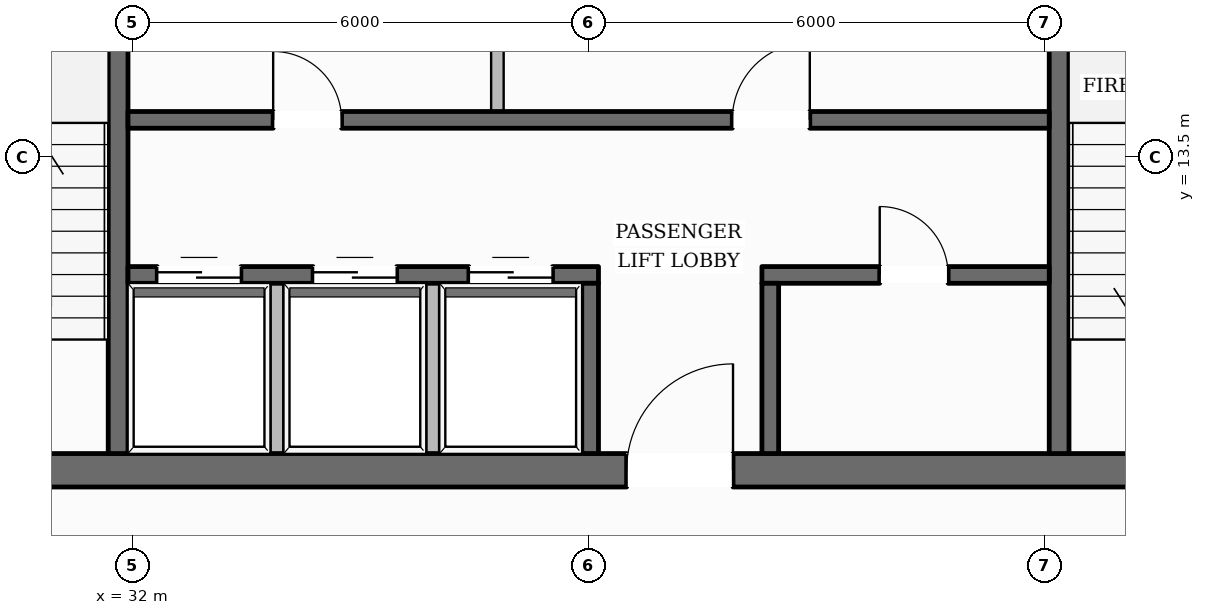
"""IFC4 building model, lengths in metres.
Left out: names, types, materials, properties, quantities, classifications, styles, units other than length and angle.
Written with IfcOpenShell. Run it as: python <this file> out.ifc"""

import sys

from ifc_helpers import new_model, si_unit, direction, frame, frame_2d, origin, place, context, subcontext, project, spatial, rectangle, extrude, element, fill, save


model = new_model("IFC4")
c1 = context("Model", 3, precision=1e-05, world=origin(), true_north=direction((0.0, 1.0)))
c2 = subcontext(c1, "Body", "Model", "MODEL_VIEW")
j1 = project(units=[si_unit("LENGTHUNIT", "METRE"), si_unit("PLANEANGLEUNIT", "RADIAN")], contexts=[c1])
p1 = place(None, origin())
s1 = spatial("IfcSite", under=j1, at=p1, CompositionType="ELEMENT")
p2 = place(p1, origin())
s2 = spatial("IfcBuilding", under=s1, at=p2, CompositionType="ELEMENT")
p3 = place(p2, frame((0.0, 0.0, 180.4)))
s3 = spatial("IfcBuildingStorey", under=s2, at=p3, CompositionType="ELEMENT", Elevation=180.4)
p4 = place(p3, frame((28.04, 9.38, 0.0), z_axis=(0.0, 0.0, 1.0), x_axis=(1.0, 0.0, 0.0)))
e1 = element("IfcWall", 1, at=p4, inside=s3, PredefinedType="SOLIDWALL", context=c2, shape_type="SweptSolid", body=[
    extrude(rectangle(XDim=19.92, YDim=0.44, at=frame_2d((9.96, 0.0))), origin(), (0.0, 0.0, 1.0), 3.6),
])
p5 = place(p4, frame((10.46, 0.0, 0.0)))
e2 = element("IfcOpeningElement", 2, at=p5, cuts=e1, PredefinedType="OPENING", context=c2, shape_type="SweptSolid", body=[
    extrude(rectangle(XDim=1.4, YDim=2.2, at=frame_2d((0.7, 1.1))), frame((0.0, 0.23, 0.0), z_axis=(0.0, -1.0, 0.0), x_axis=(1.0, 0.0, 0.0)), (0.0, 0.0, 1.0), 0.46),
])
p6 = place(p3, frame((31.81, 9.6, 0.0), z_axis=(0.0, 0.0, 1.0), x_axis=(0.0, 1.0, 0.0)))
e3 = element("IfcWall", 3, at=p6, inside=s3, PredefinedType="SHEAR", context=c2, shape_type="SweptSolid", body=[
    extrude(rectangle(XDim=13.0, YDim=0.26, at=frame_2d((6.5, 0.0))), origin(), (0.0, 0.0, 1.0), 3.6),
])
p7 = place(p6, frame((10.925, 0.0, 0.0)))
e4 = element("IfcOpeningElement", 4, at=p7, cuts=e3, PredefinedType="OPENING", context=c2, shape_type="SweptSolid", body=[
    extrude(rectangle(XDim=1.25, YDim=2.25, at=frame_2d((0.625, 1.125))), frame((0.0, 0.14, 0.0), z_axis=(0.0, -1.0, 0.0), x_axis=(1.0, 0.0, 0.0)), (0.0, 0.0, 1.0), 0.28),
])
p8 = place(p3, frame((44.19, 9.6, 0.0), z_axis=(0.0, 0.0, 1.0), x_axis=(0.0, 1.0, 0.0)))
e5 = element("IfcWall", 5, at=p8, inside=s3, PredefinedType="SHEAR", context=c2, shape_type="SweptSolid", body=[
    extrude(rectangle(XDim=13.0, YDim=0.26, at=frame_2d((6.5, 0.0))), origin(), (0.0, 0.0, 1.0), 3.6),
])
p9 = place(p8, frame((10.925, 0.0, 0.0)))
e6 = element("IfcOpeningElement", 6, at=p9, cuts=e5, PredefinedType="OPENING", context=c2, shape_type="SweptSolid", body=[
    extrude(rectangle(XDim=1.25, YDim=2.25, at=frame_2d((0.625, 1.125))), frame((0.0, 0.14, 0.0), z_axis=(0.0, -1.0, 0.0), x_axis=(1.0, 0.0, 0.0)), (0.0, 0.0, 1.0), 0.28),
])
p10 = place(p3, frame((31.94, 13.99, 0.0), z_axis=(0.0, 0.0, 1.0), x_axis=(1.0, 0.0, 0.0)))
e7 = element("IfcWall", 7, at=p10, inside=s3, PredefinedType="SOLIDWALL", context=c2, shape_type="SweptSolid", body=[
    extrude(rectangle(XDim=12.12, YDim=0.22, at=frame_2d((6.06, 0.0))), origin(), (0.0, 0.0, 1.0), 3.6),
])
p11 = place(p10, frame((1.91, 0.0, 0.0)))
e8 = element("IfcOpeningElement", 8, at=p11, cuts=e7, PredefinedType="OPENING", context=c2, shape_type="SweptSolid", body=[
    extrude(rectangle(XDim=0.9, YDim=2.1, at=frame_2d((0.45, 1.05))), frame((0.0, 0.12, 0.0), z_axis=(0.0, -1.0, 0.0), x_axis=(1.0, 0.0, 0.0)), (0.0, 0.0, 1.0), 0.24),
])
p12 = place(p10, frame((7.95, 0.0, 0.0)))
e9 = element("IfcOpeningElement", 9, at=p12, cuts=e7, PredefinedType="OPENING", context=c2, shape_type="SweptSolid", body=[
    extrude(rectangle(XDim=1.02, YDim=2.15, at=frame_2d((0.51, 1.075))), frame((0.0, 0.12, 0.0), z_axis=(0.0, -1.0, 0.0), x_axis=(1.0, 0.0, 0.0)), (0.0, 0.0, 1.0), 0.24),
])
p13 = place(p3, frame((31.94, 11.95, 0.0), z_axis=(0.0, 0.0, 1.0), x_axis=(1.0, 0.0, 0.0)))
e10 = element("IfcWall", 10, at=p13, inside=s3, PredefinedType="SOLIDWALL", context=c2, shape_type="SweptSolid", body=[
    extrude(rectangle(XDim=6.19, YDim=0.22, at=frame_2d((3.095, 0.0))), origin(), (0.0, 0.0, 1.0), 3.6),
])
p14 = place(p13, frame((0.385, 0.0, 0.0)))
e11 = element("IfcOpeningElement", 11, at=p14, cuts=e10, PredefinedType="OPENING", context=c2, shape_type="SweptSolid", body=[
    extrude(rectangle(XDim=1.1, YDim=2.2, at=frame_2d((0.55, 1.1))), frame((0.0, 0.12, 0.0), z_axis=(0.0, -1.0, 0.0), x_axis=(1.0, 0.0, 0.0)), (0.0, 0.0, 1.0), 0.24),
])
p15 = place(p13, frame((2.435, 0.0, 0.0)))
e12 = element("IfcOpeningElement", 12, at=p15, cuts=e10, PredefinedType="OPENING", context=c2, shape_type="SweptSolid", body=[
    extrude(rectangle(XDim=1.1, YDim=2.2, at=frame_2d((0.55, 1.1))), frame((0.0, 0.12, 0.0), z_axis=(0.0, -1.0, 0.0), x_axis=(1.0, 0.0, 0.0)), (0.0, 0.0, 1.0), 0.24),
])
p16 = place(p13, frame((4.485, 0.0, 0.0)))
e13 = element("IfcOpeningElement", 13, at=p16, cuts=e10, PredefinedType="OPENING", context=c2, shape_type="SweptSolid", body=[
    extrude(rectangle(XDim=1.1, YDim=2.2, at=frame_2d((0.55, 1.1))), frame((0.0, 0.12, 0.0), z_axis=(0.0, -1.0, 0.0), x_axis=(1.0, 0.0, 0.0)), (0.0, 0.0, 1.0), 0.24),
])
p17 = place(p3, frame((40.28, 11.95, 0.0), z_axis=(0.0, 0.0, 1.0), x_axis=(1.0, 0.0, 0.0)))
e14 = element("IfcWall", 14, at=p17, inside=s3, PredefinedType="SOLIDWALL", context=c2, shape_type="SweptSolid", body=[
    extrude(rectangle(XDim=3.78, YDim=0.22, at=frame_2d((1.89, 0.0))), origin(), (0.0, 0.0, 1.0), 3.6),
])
p18 = place(p17, frame((1.55, 0.0, 0.0)))
e15 = element("IfcOpeningElement", 15, at=p18, cuts=e14, PredefinedType="OPENING", context=c2, shape_type="SweptSolid", body=[
    extrude(rectangle(XDim=0.9, YDim=2.1, at=frame_2d((0.45, 1.05))), frame((0.0, 0.12, 0.0), z_axis=(0.0, -1.0, 0.0), x_axis=(1.0, 0.0, 0.0)), (0.0, 0.0, 1.0), 0.24),
])
for number, where, z_axis, x_axis in (
    (16, (38.02, 9.6, 0.0), (0.0, 0.0, 1.0), (0.0, 1.0, 0.0)),
    (17, (40.39, 9.6, 0.0), (0.0, 0.0, 1.0), (0.0, 1.0, 0.0)),
):
    element("IfcWall", number, at=place(p3, frame(where, z_axis=z_axis, x_axis=x_axis)), inside=s3, PredefinedType="SOLIDWALL", context=c2, shape_type="SweptSolid", body=[
        extrude(rectangle(XDim=2.24, YDim=0.22, at=frame_2d((1.12, 0.0))), origin(), (0.0, 0.0, 1.0), 3.6),
    ])
p19 = place(p3, frame((15.064, 11.953, 0.0), z_axis=(0.0, 0.0, 1.0), x_axis=(0.495993114815, 0.86832645362, 0.0)))
e18 = element("IfcWall", 18, at=p19, inside=s3, PredefinedType="STANDARD", context=c2, shape_type="SweptSolid", body=[
    extrude(rectangle(XDim=37.324, YDim=0.35, at=frame_2d((18.662, 0.0))), origin(), (0.0, 0.0, 1.0), 3.132),
])
p20 = place(p19, frame((33.087, 0.0, 0.65)))
e19 = element("IfcOpeningElement", 19, at=p20, cuts=e18, PredefinedType="OPENING", context=c2, shape_type="SweptSolid", body=[
    extrude(rectangle(XDim=1.45, YDim=1.75, at=frame_2d((0.725, 0.875))), frame((0.0, 0.185, 0.0), z_axis=(0.0, -1.0, 0.0), x_axis=(1.0, 0.0, 0.0)), (0.0, 0.0, 1.0), 0.37),
])
p21 = place(p19, frame((27.026, 0.0, 0.65)))
e20 = element("IfcOpeningElement", 20, at=p21, cuts=e18, PredefinedType="OPENING", context=c2, shape_type="SweptSolid", body=[
    extrude(rectangle(XDim=1.45, YDim=1.75, at=frame_2d((0.725, 0.875))), frame((0.0, 0.185, 0.0), z_axis=(0.0, -1.0, 0.0), x_axis=(1.0, 0.0, 0.0)), (0.0, 0.0, 1.0), 0.37),
])
p22 = place(p19, frame((14.904, 0.0, 0.65)))
e21 = element("IfcOpeningElement", 21, at=p22, cuts=e18, PredefinedType="OPENING", context=c2, shape_type="SweptSolid", body=[
    extrude(rectangle(XDim=1.45, YDim=1.75, at=frame_2d((0.725, 0.875))), frame((0.0, 0.185, 0.0), z_axis=(0.0, -1.0, 0.0), x_axis=(1.0, 0.0, 0.0)), (0.0, 0.0, 1.0), 0.37),
])
p23 = place(p19, frame((8.844, 0.0, 0.65)))
e22 = element("IfcOpeningElement", 22, at=p23, cuts=e18, PredefinedType="OPENING", context=c2, shape_type="SweptSolid", body=[
    extrude(rectangle(XDim=1.45, YDim=1.75, at=frame_2d((0.725, 0.875))), frame((0.0, 0.185, 0.0), z_axis=(0.0, -1.0, 0.0), x_axis=(1.0, 0.0, 0.0)), (0.0, 0.0, 1.0), 0.37),
])
p24 = place(p19, frame((2.782, 0.0, 0.65)))
e23 = element("IfcOpeningElement", 23, at=p24, cuts=e18, PredefinedType="OPENING", context=c2, shape_type="SweptSolid", body=[
    extrude(rectangle(XDim=1.45, YDim=1.75, at=frame_2d((0.725, 0.875))), frame((0.0, 0.185, 0.0), z_axis=(0.0, -1.0, 0.0), x_axis=(1.0, 0.0, 0.0)), (0.0, 0.0, 1.0), 0.37),
])
p25 = place(p3, frame((42.575, 44.272, 0.0), z_axis=(0.0, 0.0, 1.0), x_axis=(0.503934681705, -0.863741764982, 0.0)))
e24 = element("IfcWall", 24, at=p25, inside=s3, PredefinedType="STANDARD", context=c2, shape_type="SweptSolid", body=[
    extrude(rectangle(XDim=37.915, YDim=0.35, at=frame_2d((18.958, 0.0))), origin(), (0.0, 0.0, 1.0), 3.132),
])
p26 = place(p25, frame((33.633, 0.0, 0.65)))
e25 = element("IfcOpeningElement", 25, at=p26, cuts=e24, PredefinedType="OPENING", context=c2, shape_type="SweptSolid", body=[
    extrude(rectangle(XDim=1.45, YDim=1.75, at=frame_2d((0.725, 0.875))), frame((0.0, 0.185, 0.0), z_axis=(0.0, -1.0, 0.0), x_axis=(1.0, 0.0, 0.0)), (0.0, 0.0, 1.0), 0.37),
])
p27 = place(p25, frame((27.472, 0.0, 0.65)))
e26 = element("IfcOpeningElement", 26, at=p27, cuts=e24, PredefinedType="OPENING", context=c2, shape_type="SweptSolid", body=[
    extrude(rectangle(XDim=1.45, YDim=1.75, at=frame_2d((0.725, 0.875))), frame((0.0, 0.185, 0.0), z_axis=(0.0, -1.0, 0.0), x_axis=(1.0, 0.0, 0.0)), (0.0, 0.0, 1.0), 0.37),
])
p28 = place(p25, frame((15.15, 0.0, 0.65)))
e27 = element("IfcOpeningElement", 27, at=p28, cuts=e24, PredefinedType="OPENING", context=c2, shape_type="SweptSolid", body=[
    extrude(rectangle(XDim=1.45, YDim=1.75, at=frame_2d((0.725, 0.875))), frame((0.0, 0.185, 0.0), z_axis=(0.0, -1.0, 0.0), x_axis=(1.0, 0.0, 0.0)), (0.0, 0.0, 1.0), 0.37),
])
p29 = place(p25, frame((8.989, 0.0, 0.65)))
e28 = element("IfcOpeningElement", 28, at=p29, cuts=e24, PredefinedType="OPENING", context=c2, shape_type="SweptSolid", body=[
    extrude(rectangle(XDim=1.45, YDim=1.75, at=frame_2d((0.725, 0.875))), frame((0.0, 0.185, 0.0), z_axis=(0.0, -1.0, 0.0), x_axis=(1.0, 0.0, 0.0)), (0.0, 0.0, 1.0), 0.37),
])
p30 = place(p25, frame((2.828, 0.0, 0.65)))
e29 = element("IfcOpeningElement", 29, at=p30, cuts=e24, PredefinedType="OPENING", context=c2, shape_type="SweptSolid", body=[
    extrude(rectangle(XDim=1.45, YDim=1.75, at=frame_2d((0.725, 0.875))), frame((0.0, 0.185, 0.0), z_axis=(0.0, -1.0, 0.0), x_axis=(1.0, 0.0, 0.0)), (0.0, 0.0, 1.0), 0.37),
])
for number, where, z_axis, x_axis in (
    (30, (33.9, 9.52, 0.0), (0.0, 0.0, 1.0), (0.0, 1.0, 0.0)),
    (31, (35.95, 9.52, 0.0), (0.0, 0.0, 1.0), (0.0, 1.0, 0.0)),
):
    element("IfcWall", number, at=place(p3, frame(where, z_axis=z_axis, x_axis=x_axis)), inside=s3, PredefinedType="PARTITIONING", context=c2, shape_type="SweptSolid", body=[
        extrude(rectangle(XDim=2.32, YDim=0.165, at=frame_2d((1.16, 0.0))), origin(), (0.0, 0.0, 1.0), 3.6),
    ])
p31 = place(p3, frame((36.8, 14.1, 0.0), z_axis=(0.0, 0.0, 1.0), x_axis=(0.0, 1.0, 0.0)))
e32 = element("IfcWall", 32, at=p31, inside=s3, PredefinedType="PARTITIONING", context=c2, shape_type="SweptSolid", body=[
    extrude(rectangle(XDim=2.24, YDim=0.165, at=frame_2d((1.12, 0.0))), origin(), (0.0, 0.0, 1.0), 3.6),
])
p32 = place(p5, origin())
e33 = element("IfcDoor", 33, at=p32, inside=s3, OperationType="SINGLE_SWING_RIGHT", PredefinedType="DOOR", context=c2, shape_type="SweptSolid", body=[
    extrude(rectangle(XDim=1.4, YDim=2.2, at=frame_2d((0.7, 1.1))), frame((0.0, 0.025, 0.0), z_axis=(0.0, -1.0, 0.0), x_axis=(1.0, 0.0, 0.0)), (0.0, 0.0, 1.0), 0.05),
])
fill(e2, e33)
p33 = place(p14, origin())
e34 = element("IfcDoor", 34, at=p33, inside=s3, OperationType="DOUBLE_DOOR_SLIDING", PredefinedType="DOOR", context=c2, shape_type="SweptSolid", body=[
    extrude(rectangle(XDim=1.1, YDim=2.2, at=frame_2d((0.55, 1.1))), frame((0.0, 0.025, 0.0), z_axis=(0.0, -1.0, 0.0), x_axis=(1.0, 0.0, 0.0)), (0.0, 0.0, 1.0), 0.05),
])
fill(e11, e34)
p34 = place(p15, origin())
e35 = element("IfcDoor", 35, at=p34, inside=s3, OperationType="DOUBLE_DOOR_SLIDING", PredefinedType="DOOR", context=c2, shape_type="SweptSolid", body=[
    extrude(rectangle(XDim=1.1, YDim=2.2, at=frame_2d((0.55, 1.1))), frame((0.0, 0.025, 0.0), z_axis=(0.0, -1.0, 0.0), x_axis=(1.0, 0.0, 0.0)), (0.0, 0.0, 1.0), 0.05),
])
fill(e12, e35)
p35 = place(p16, origin())
e36 = element("IfcDoor", 36, at=p35, inside=s3, OperationType="DOUBLE_DOOR_SLIDING", PredefinedType="DOOR", context=c2, shape_type="SweptSolid", body=[
    extrude(rectangle(XDim=1.1, YDim=2.2, at=frame_2d((0.55, 1.1))), frame((0.0, 0.025, 0.0), z_axis=(0.0, -1.0, 0.0), x_axis=(1.0, 0.0, 0.0)), (0.0, 0.0, 1.0), 0.05),
])
fill(e13, e36)
p36 = place(p11, origin())
e37 = element("IfcDoor", 37, at=p36, inside=s3, OperationType="SINGLE_SWING_LEFT", PredefinedType="DOOR", context=c2, shape_type="SweptSolid", body=[
    extrude(rectangle(XDim=0.9, YDim=2.1, at=frame_2d((0.45, 1.05))), frame((0.0, 0.025, 0.0), z_axis=(0.0, -1.0, 0.0), x_axis=(1.0, 0.0, 0.0)), (0.0, 0.0, 1.0), 0.05),
])
fill(e8, e37)
p37 = place(p12, origin())
e38 = element("IfcDoor", 38, at=p37, inside=s3, OperationType="SINGLE_SWING_RIGHT", PredefinedType="DOOR", context=c2, shape_type="SweptSolid", body=[
    extrude(rectangle(XDim=1.02, YDim=2.15, at=frame_2d((0.51, 1.075))), frame((0.0, 0.025, 0.0), z_axis=(0.0, -1.0, 0.0), x_axis=(1.0, 0.0, 0.0)), (0.0, 0.0, 1.0), 0.05),
])
fill(e9, e38)
p38 = place(p18, origin())
e39 = element("IfcDoor", 39, at=p38, inside=s3, OperationType="SINGLE_SWING_LEFT", PredefinedType="DOOR", context=c2, shape_type="SweptSolid", body=[
    extrude(rectangle(XDim=0.9, YDim=2.1, at=frame_2d((0.45, 1.05))), frame((0.0, 0.025, 0.0), z_axis=(0.0, -1.0, 0.0), x_axis=(1.0, 0.0, 0.0)), (0.0, 0.0, 1.0), 0.05),
])
fill(e15, e39)
save(model, sys.argv[1])
